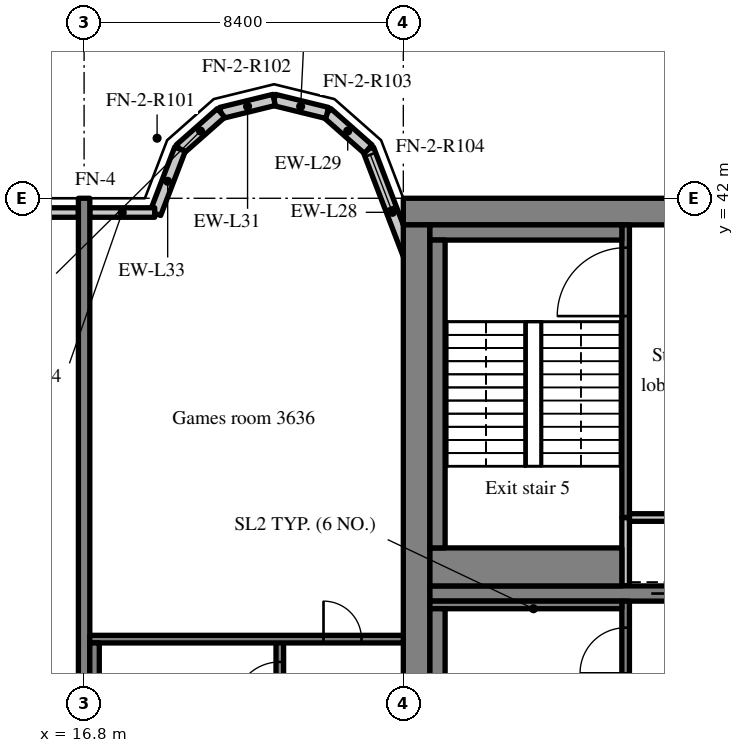
"""IFC4 building model, lengths in metres.
Left out: names, types, materials, properties, quantities, classifications, styles, units other than length and angle.
Written with IfcOpenShell. Run it as: python <this file> out.ifc"""

import sys

from ifc_helpers import new_model, si_unit, direction, frame, frame_2d, origin, place, context, subcontext, project, spatial, rectangle, extrude, source, transform, mapped, element, fill, save


model = new_model("IFC4")
c1 = context("Model", 3, precision=1e-05, world=origin(), true_north=direction((0.0, 1.0)))
c2 = subcontext(c1, "Body", "Model", "MODEL_VIEW")
j1 = project(units=[si_unit("LENGTHUNIT", "METRE"), si_unit("PLANEANGLEUNIT", "RADIAN")], contexts=[c1])
p1 = place(None, origin())
s1 = spatial("IfcSite", under=j1, at=p1, CompositionType="ELEMENT")
p2 = place(p1, origin())
s2 = spatial("IfcBuilding", under=s1, at=p2, CompositionType="ELEMENT")
p3 = place(p2, frame((0.0, 0.0, 151.6)))
s3 = spatial("IfcBuildingStorey", under=s2, at=p3, CompositionType="ELEMENT", Elevation=151.6)
m1 = source(origin(), c2, "Body", "SweptSolid", [
    extrude(rectangle(XDim=50.4, YDim=0.7, at=frame_2d((25.2, 0.0))), origin(), (0.0, 0.0, 1.0), 3.52),
])
p4 = place(p3, frame((25.2, 41.65, 0.0), z_axis=(0.0, 0.0, 1.0), x_axis=(1.0, 0.0, 0.0)))
e1 = element("IfcWall", 1, at=p4, inside=s3, PredefinedType="SHEAR", context=c2, shape_type="MappedRepresentation", body=[
    mapped(m1, transform((0.0, 0.0, 0.0), scale=1.0)),
])
m2 = source(origin(), c2, "Body", "SweptSolid", [
    extrude(rectangle(XDim=18.6, YDim=0.7, at=frame_2d((9.3, 0.0))), origin(), (0.0, 0.0, 1.0), 3.52),
])
p5 = place(p3, frame((25.55, 22.7, 0.0), z_axis=(0.0, 0.0, 1.0), x_axis=(0.0, 1.0, 0.0)))
e2 = element("IfcWall", 2, at=p5, inside=s3, PredefinedType="SHEAR", context=c2, shape_type="MappedRepresentation", body=[
    mapped(m2, transform((0.0, 0.0, 0.0), scale=1.0)),
])
m3 = source(origin(), c2, "Body", "SweptSolid", [
    extrude(rectangle(XDim=7.5, YDim=0.4, at=frame_2d((3.75, 0.0))), origin(), (0.0, 0.0, 1.0), 3.52),
])
p6 = place(p3, frame((25.9, 31.6, 0.0), z_axis=(0.0, 0.0, 1.0), x_axis=(1.0, 0.0, 0.0)))
e3 = element("IfcWall", 3, at=p6, inside=s3, PredefinedType="SHEAR", context=c2, shape_type="MappedRepresentation", body=[
    mapped(m3, transform((0.0, 0.0, 0.0), scale=1.0)),
])
m4 = source(origin(), c2, "Body", "SweptSolid", [
    extrude(rectangle(XDim=1.1, YDim=2.1, at=frame_2d((0.55, 1.05))), frame((0.0, 0.21, 0.0), z_axis=(0.0, -1.0, 0.0), x_axis=(1.0, 0.0, 0.0)), (0.0, 0.0, 1.0), 0.42),
])
p7 = place(p6, frame((5.825, 0.0, 0.0)))
e4 = element("IfcOpeningElement", 4, at=p7, cuts=e3, PredefinedType="OPENING", context=c2, shape_type="MappedRepresentation", body=[
    mapped(m4, transform((0.0, 0.0, 0.0), scale=1.0)),
])
m5 = source(origin(), c2, "Body", "SweptSolid", [
    extrude(rectangle(XDim=20.0, YDim=0.3, at=frame_2d((10.0, 0.0))), origin(), (0.0, 0.0, 1.0), 3.52),
])
p8 = place(p3, frame((16.8, 22.0, 0.0), z_axis=(0.0, 0.0, 1.0), x_axis=(0.0, 1.0, 0.0)))
e5 = element("IfcWall", 5, at=p8, inside=s3, PredefinedType="SHEAR", context=c2, shape_type="MappedRepresentation", body=[
    mapped(m5, transform((0.0, 0.0, 0.0), scale=1.0)),
])
m6 = source(origin(), c2, "Body", "SweptSolid", [
    extrude(rectangle(XDim=3.559, YDim=0.3, at=frame_2d((1.78, 0.0))), origin(), (0.0, 0.0, 1.0), 3.52),
])
p9 = place(p3, frame((25.55, 39.969, 0.0), z_axis=(0.0, 0.0, 1.0), x_axis=(-0.35779745313, 0.933799219604, 0.0)))
e6 = element("IfcWall", 6, at=p9, inside=s3, PredefinedType="SOLIDWALL", context=c2, shape_type="MappedRepresentation", body=[
    mapped(m6, transform((0.0, 0.0, 0.0), scale=1.0)),
])
m7 = source(origin(), c2, "Body", "SweptSolid", [
    extrude(rectangle(XDim=1.5, YDim=2.0, at=frame_2d((0.75, 1.0))), frame((0.0, 0.16, 0.0), z_axis=(0.0, -1.0, 0.0), x_axis=(1.0, 0.0, 0.0)), (0.0, 0.0, 1.0), 0.32),
])
p10 = place(p9, frame((1.903, 0.0, 0.9)))
e7 = element("IfcOpeningElement", 7, at=p10, cuts=e6, PredefinedType="OPENING", context=c2, shape_type="MappedRepresentation", body=[
    mapped(m7, transform((0.0, 0.0, 0.0), scale=1.0)),
])
m8 = source(origin(), c2, "Body", "SweptSolid", [
    extrude(rectangle(XDim=1.44, YDim=0.3, at=frame_2d((0.72, 0.0))), origin(), (0.0, 0.0, 1.0), 3.52),
])
p11 = place(p3, frame((24.277, 43.292, 0.0), z_axis=(0.0, 0.0, 1.0), x_axis=(-0.749649827867, 0.661834673902, 0.0)))
e8 = element("IfcWall", 8, at=p11, inside=s3, PredefinedType="SOLIDWALL", context=c2, shape_type="MappedRepresentation", body=[
    mapped(m8, transform((0.0, 0.0, 0.0), scale=1.0)),
])
m9 = source(origin(), c2, "Body", "SweptSolid", [
    extrude(rectangle(XDim=1.438, YDim=0.3, at=frame_2d((0.719, 0.0))), origin(), (0.0, 0.0, 1.0), 3.52),
])
p12 = place(p3, frame((23.197, 44.245, 0.0), z_axis=(0.0, 0.0, 1.0), x_axis=(-0.971152283879, 0.238460146601, 0.0)))
e9 = element("IfcWall", 9, at=p12, inside=s3, PredefinedType="SOLIDWALL", context=c2, shape_type="MappedRepresentation", body=[
    mapped(m9, transform((0.0, 0.0, 0.0), scale=1.0)),
])
m10 = source(origin(), c2, "Body", "SweptSolid", [
    extrude(rectangle(XDim=1.439, YDim=0.3, at=frame_2d((0.719, 0.0))), origin(), (0.0, 0.0, 1.0), 3.52),
])
p13 = place(p3, frame((21.8, 44.588, 0.0), z_axis=(0.0, 0.0, 1.0), x_axis=(-0.971161932466, -0.238420848351, 0.0)))
e10 = element("IfcWall", 10, at=p13, inside=s3, PredefinedType="SOLIDWALL", context=c2, shape_type="MappedRepresentation", body=[
    mapped(m10, transform((0.0, 0.0, 0.0), scale=1.0)),
])
m11 = source(origin(), c2, "Body", "SweptSolid", [
    extrude(rectangle(XDim=1.44, YDim=0.3, at=frame_2d((0.72, 0.0))), origin(), (0.0, 0.0, 1.0), 3.52),
])
p14 = place(p3, frame((20.403, 44.245, 0.0), z_axis=(0.0, 0.0, 1.0), x_axis=(-0.74957555648, -0.661918790432, 0.0)))
e11 = element("IfcWall", 11, at=p14, inside=s3, PredefinedType="SOLIDWALL", context=c2, shape_type="MappedRepresentation", body=[
    mapped(m11, transform((0.0, 0.0, 0.0), scale=1.0)),
])
m12 = source(origin(), c2, "Body", "SweptSolid", [
    extrude(rectangle(XDim=1.812, YDim=0.3, at=frame_2d((0.906, 0.0))), origin(), (0.0, 0.0, 1.0), 3.52),
])
p15 = place(p3, frame((19.323, 43.292, 0.0), z_axis=(0.0, 0.0, 1.0), x_axis=(-0.357877270961, -0.93376863244, 0.0)))
e12 = element("IfcWall", 12, at=p15, inside=s3, PredefinedType="SOLIDWALL", context=c2, shape_type="MappedRepresentation", body=[
    mapped(m12, transform((0.0, 0.0, 0.0), scale=1.0)),
])
m13 = source(origin(), c2, "Body", "SweptSolid", [
    extrude(rectangle(XDim=4.094, YDim=0.25, at=frame_2d((2.047, 0.0))), origin(), (0.0, 0.0, 1.0), 2.87),
])
p16 = place(p3, frame((16.65, 41.625, 0.0), z_axis=(0.0, 0.0, 1.0), x_axis=(-1.0, 0.0, 0.0)))
e13 = element("IfcWall", 13, at=p16, inside=s3, PredefinedType="SOLIDWALL", context=c2, shape_type="MappedRepresentation", body=[
    mapped(m13, transform((0.0, 0.0, 0.0), scale=1.0)),
])
m14 = source(origin(), c2, "Body", "SweptSolid", [
    extrude(rectangle(XDim=1.5, YDim=1.5, at=frame_2d((0.75, 0.75))), frame((0.0, 0.135, 0.0), z_axis=(0.0, -1.0, 0.0), x_axis=(1.0, 0.0, 0.0)), (0.0, 0.0, 1.0), 0.27),
])
p17 = place(p16, frame((1.297, 0.0, 0.9)))
e14 = element("IfcOpeningElement", 14, at=p17, cuts=e13, PredefinedType="OPENING", context=c2, shape_type="MappedRepresentation", body=[
    mapped(m14, transform((0.0, 0.0, 0.0), scale=1.0)),
])
m15 = source(origin(), c2, "Body", "SweptSolid", [
    extrude(rectangle(XDim=1.708, YDim=0.25, at=frame_2d((0.854, 0.0))), origin(), (0.0, 0.0, 1.0), 2.87),
])
p18 = place(p3, frame((18.658, 41.625, 0.0), z_axis=(0.0, 0.0, 1.0), x_axis=(-1.0, 0.0, 0.0)))
e15 = element("IfcWall", 15, at=p18, inside=s3, PredefinedType="SOLIDWALL", context=c2, shape_type="MappedRepresentation", body=[
    mapped(m15, transform((0.0, 0.0, 0.0), scale=1.0)),
])
m16 = source(origin(), c2, "Body", "SweptSolid", [
    extrude(rectangle(XDim=8.7, YDim=0.2, at=frame_2d((4.35, 0.0))), origin(), (0.0, 0.0, 1.0), 3.52),
])
p19 = place(p3, frame((31.05, 22.7, 0.0), z_axis=(0.0, 0.0, 1.0), x_axis=(0.0, 1.0, 0.0)))
e16 = element("IfcWall", 16, at=p19, inside=s3, PredefinedType="SOLIDWALL", context=c2, shape_type="MappedRepresentation", body=[
    mapped(m16, transform((0.0, 0.0, 0.0), scale=1.0)),
])
m17 = source(origin(), c2, "Body", "SweptSolid", [
    extrude(rectangle(XDim=1.2, YDim=2.1, at=frame_2d((0.6, 1.05))), frame((0.0, 0.11, 0.0), z_axis=(0.0, -1.0, 0.0), x_axis=(1.0, 0.0, 0.0)), (0.0, 0.0, 1.0), 0.22),
])
p20 = place(p19, frame((6.8, 0.0, 0.0)))
e17 = element("IfcOpeningElement", 17, at=p20, cuts=e16, PredefinedType="OPENING", context=c2, shape_type="MappedRepresentation", body=[
    mapped(m17, transform((0.0, 0.0, 0.0), scale=1.0)),
])
m18 = source(origin(), c2, "Body", "SweptSolid", [
    extrude(rectangle(XDim=1.8, YDim=0.2, at=frame_2d((0.9, 0.0))), origin(), (0.0, 0.0, 1.0), 3.52),
])
p21 = place(p3, frame((31.05, 31.8, 0.0), z_axis=(0.0, 0.0, 1.0), x_axis=(0.0, 1.0, 0.0)))
e18 = element("IfcWall", 18, at=p21, inside=s3, PredefinedType="SOLIDWALL", context=c2, shape_type="MappedRepresentation", body=[
    mapped(m18, transform((0.0, 0.0, 0.0), scale=1.0)),
])
m19 = source(origin(), c2, "Body", "SweptSolid", [
    extrude(rectangle(XDim=2.25, YDim=0.2, at=frame_2d((1.125, 0.0))), origin(), (0.0, 0.0, 1.0), 3.52),
])
p22 = place(p3, frame((31.15, 33.6, 0.0), z_axis=(0.0, 0.0, 1.0), x_axis=(1.0, 0.0, 0.0)))
e19 = element("IfcWall", 19, at=p22, inside=s3, PredefinedType="SOLIDWALL", context=c2, shape_type="MappedRepresentation", body=[
    mapped(m19, transform((0.0, 0.0, 0.0), scale=1.0)),
])
m20 = source(origin(), c2, "Body", "SweptSolid", [
    extrude(rectangle(XDim=7.7, YDim=0.2, at=frame_2d((3.85, 0.0))), origin(), (0.0, 0.0, 1.0), 3.52),
])
p23 = place(p3, frame((31.05, 33.6, 0.0), z_axis=(0.0, 0.0, 1.0), x_axis=(0.0, 1.0, 0.0)))
e20 = element("IfcWall", 20, at=p23, inside=s3, PredefinedType="SOLIDWALL", context=c2, shape_type="MappedRepresentation", body=[
    mapped(m20, transform((0.0, 0.0, 0.0), scale=1.0)),
])
m21 = source(origin(), c2, "Body", "SweptSolid", [
    extrude(rectangle(XDim=1.8, YDim=2.1, at=frame_2d((0.9, 1.05))), frame((0.0, 0.11, 0.0), z_axis=(0.0, -1.0, 0.0), x_axis=(1.0, 0.0, 0.0)), (0.0, 0.0, 1.0), 0.22),
])
p24 = place(p23, frame((5.3, 0.0, 0.0)))
e21 = element("IfcOpeningElement", 21, at=p24, cuts=e20, PredefinedType="OPENING", context=c2, shape_type="MappedRepresentation", body=[
    mapped(m21, transform((0.0, 0.0, 0.0), scale=1.0)),
])
m22 = source(origin(), c2, "Body", "SweptSolid", [
    extrude(rectangle(XDim=8.3, YDim=0.2, at=frame_2d((4.15, 0.0))), origin(), (0.0, 0.0, 1.0), 3.52),
])
p25 = place(p3, frame((21.95, 22.1, 0.0), z_axis=(0.0, 0.0, 1.0), x_axis=(0.0, 1.0, 0.0)))
e22 = element("IfcWall", 22, at=p25, inside=s3, PredefinedType="SOLIDWALL", context=c2, shape_type="MappedRepresentation", body=[
    mapped(m22, transform((0.0, 0.0, 0.0), scale=1.0)),
])
p26 = place(p25, frame((6.5, 0.0, 0.0)))
e23 = element("IfcOpeningElement", 23, at=p26, cuts=e22, PredefinedType="OPENING", context=c2, shape_type="MappedRepresentation", body=[
    mapped(m17, transform((0.0, 0.0, 0.0), scale=1.0)),
])
m23 = source(origin(), c2, "Body", "SweptSolid", [
    extrude(rectangle(XDim=8.25, YDim=0.2, at=frame_2d((4.125, 0.0))), origin(), (0.0, 0.0, 1.0), 3.52),
])
p27 = place(p3, frame((16.95, 30.4, 0.0), z_axis=(0.0, 0.0, 1.0), x_axis=(1.0, 0.0, 0.0)))
e24 = element("IfcWall", 24, at=p27, inside=s3, PredefinedType="SOLIDWALL", context=c2, shape_type="MappedRepresentation", body=[
    mapped(m23, transform((0.0, 0.0, 0.0), scale=1.0)),
])
m24 = source(origin(), c2, "Body", "SweptSolid", [
    extrude(rectangle(XDim=1.0, YDim=2.1, at=frame_2d((0.5, 1.05))), frame((0.0, 0.11, 0.0), z_axis=(0.0, -1.0, 0.0), x_axis=(1.0, 0.0, 0.0)), (0.0, 0.0, 1.0), 0.22),
])
p28 = place(p27, frame((6.15, 0.0, 0.0)))
e25 = element("IfcOpeningElement", 25, at=p28, cuts=e24, PredefinedType="OPENING", context=c2, shape_type="MappedRepresentation", body=[
    mapped(m24, transform((0.0, 0.0, 0.0), scale=1.0)),
])
m25 = source(origin(), c2, "Body", "SweptSolid", [
    extrude(rectangle(XDim=5.05, YDim=0.2, at=frame_2d((2.525, 0.0))), origin(), (0.0, 0.0, 1.0), 3.52),
])
p29 = place(p3, frame((25.9, 31.3, 0.0), z_axis=(0.0, 0.0, 1.0), x_axis=(1.0, 0.0, 0.0)))
e26 = element("IfcWall", 26, at=p29, inside=s3, PredefinedType="SOLIDWALL", context=c2, shape_type="MappedRepresentation", body=[
    mapped(m25, transform((0.0, 0.0, 0.0), scale=1.0)),
])
m26 = source(origin(), c2, "Body", "SweptSolid", [
    extrude(rectangle(XDim=8.1, YDim=0.4, at=frame_2d((4.05, 0.0))), origin(), (0.0, 0.0, 1.0), 3.52),
])
p30 = place(p3, frame((26.1, 23.1, 0.0), z_axis=(0.0, 0.0, 1.0), x_axis=(0.0, 1.0, 0.0)))
e27 = element("IfcWall", 27, at=p30, inside=s3, PredefinedType="SOLIDWALL", context=c2, shape_type="MappedRepresentation", body=[
    mapped(m26, transform((0.0, 0.0, 0.0), scale=1.0)),
])
m27 = source(origin(), c2, "Body", "SweptSolid", [
    extrude(rectangle(XDim=8.1, YDim=0.25, at=frame_2d((4.05, 0.0))), origin(), (0.0, 0.0, 1.0), 3.52),
])
p31 = place(p3, frame((17.075, 22.2, 0.0), z_axis=(0.0, 0.0, 1.0), x_axis=(0.0, 1.0, 0.0)))
e28 = element("IfcWall", 28, at=p31, inside=s3, PredefinedType="SOLIDWALL", context=c2, shape_type="MappedRepresentation", body=[
    mapped(m27, transform((0.0, 0.0, 0.0), scale=1.0)),
])
m28 = source(origin(), c2, "Body", "SweptSolid", [
    extrude(rectangle(XDim=5.05, YDim=0.4, at=frame_2d((2.525, 0.0))), origin(), (0.0, 0.0, 1.0), 3.52),
])
p32 = place(p3, frame((25.9, 41.1, 0.0), z_axis=(0.0, 0.0, 1.0), x_axis=(1.0, 0.0, 0.0)))
e29 = element("IfcWall", 29, at=p32, inside=s3, PredefinedType="SOLIDWALL", context=c2, shape_type="MappedRepresentation", body=[
    mapped(m28, transform((0.0, 0.0, 0.0), scale=1.0)),
])
m29 = source(origin(), c2, "Body", "SweptSolid", [
    extrude(rectangle(XDim=5.05, YDim=1.0, at=frame_2d((2.525, 0.0))), origin(), (0.0, 0.0, 1.0), 3.52),
])
p33 = place(p3, frame((25.9, 32.3, 0.0), z_axis=(0.0, 0.0, 1.0), x_axis=(1.0, 0.0, 0.0)))
e30 = element("IfcWall", 30, at=p33, inside=s3, PredefinedType="SOLIDWALL", context=c2, shape_type="MappedRepresentation", body=[
    mapped(m29, transform((0.0, 0.0, 0.0), scale=1.0)),
])
p34 = place(p3, frame((26.1, 32.8, 0.0), z_axis=(0.0, 0.0, 1.0), x_axis=(0.0, 1.0, 0.0)))
e31 = element("IfcWall", 31, at=p34, inside=s3, PredefinedType="SOLIDWALL", context=c2, shape_type="MappedRepresentation", body=[
    mapped(m26, transform((0.0, 0.0, 0.0), scale=1.0)),
])
m30 = source(origin(), c2, "Body", "SweptSolid", [
    extrude(rectangle(XDim=1.5, YDim=2.0, at=frame_2d((0.75, 1.0))), frame((0.0, 0.03, 0.0), z_axis=(0.0, -1.0, 0.0), x_axis=(1.0, 0.0, 0.0)), (0.0, 0.0, 1.0), 0.06),
])
p35 = place(p10, origin())
e32 = element("IfcWindow", 32, at=p35, inside=s3, PartitioningType="SINGLE_PANEL", PredefinedType="WINDOW", context=c2, shape_type="MappedRepresentation", body=[
    mapped(m30, transform((0.0, 0.0, 0.0), scale=1.0)),
])
fill(e7, e32)
m31 = source(origin(), c2, "Body", "SweptSolid", [
    extrude(rectangle(XDim=1.2, YDim=2.1, at=frame_2d((0.6, 1.05))), frame((0.0, 0.025, 0.0), z_axis=(0.0, -1.0, 0.0), x_axis=(1.0, 0.0, 0.0)), (0.0, 0.0, 1.0), 0.05),
])
p36 = place(p20, origin())
e33 = element("IfcDoor", 33, at=p36, inside=s3, OperationType="SINGLE_SWING_LEFT", PredefinedType="DOOR", context=c2, shape_type="MappedRepresentation", body=[
    mapped(m31, transform((0.0, 0.0, 0.0), scale=1.0)),
])
fill(e17, e33)
m32 = source(origin(), c2, "Body", "SweptSolid", [
    extrude(rectangle(XDim=1.1, YDim=2.1, at=frame_2d((0.55, 1.05))), frame((0.0, 0.025, 0.0), z_axis=(0.0, -1.0, 0.0), x_axis=(1.0, 0.0, 0.0)), (0.0, 0.0, 1.0), 0.05),
])
p37 = place(p7, origin())
e34 = element("IfcDoor", 34, at=p37, inside=s3, OperationType="SLIDING_TO_RIGHT", PredefinedType="DOOR", context=c2, shape_type="MappedRepresentation", body=[
    mapped(m32, transform((0.0, 0.0, 0.0), scale=1.0)),
])
fill(e4, e34)
m33 = source(origin(), c2, "Body", "SweptSolid", [
    extrude(rectangle(XDim=1.8, YDim=2.1, at=frame_2d((0.9, 1.05))), frame((0.0, 0.025, 0.0), z_axis=(0.0, -1.0, 0.0), x_axis=(1.0, 0.0, 0.0)), (0.0, 0.0, 1.0), 0.05),
])
p38 = place(p24, origin())
e35 = element("IfcDoor", 35, at=p38, inside=s3, OperationType="SINGLE_SWING_LEFT", PredefinedType="DOOR", context=c2, shape_type="MappedRepresentation", body=[
    mapped(m33, transform((0.0, 0.0, 0.0), scale=1.0)),
])
fill(e21, e35)
p39 = place(p26, origin())
e36 = element("IfcDoor", 36, at=p39, inside=s3, OperationType="SINGLE_SWING_LEFT", PredefinedType="DOOR", context=c2, shape_type="MappedRepresentation", body=[
    mapped(m31, transform((0.0, 0.0, 0.0), scale=1.0)),
])
fill(e23, e36)
m34 = source(origin(), c2, "Body", "SweptSolid", [
    extrude(rectangle(XDim=1.0, YDim=2.1, at=frame_2d((0.5, 1.05))), frame((0.0, 0.025, 0.0), z_axis=(0.0, -1.0, 0.0), x_axis=(1.0, 0.0, 0.0)), (0.0, 0.0, 1.0), 0.05),
])
p40 = place(p28, origin())
e37 = element("IfcDoor", 37, at=p40, inside=s3, OperationType="SINGLE_SWING_LEFT", PredefinedType="DOOR", context=c2, shape_type="MappedRepresentation", body=[
    mapped(m34, transform((0.0, 0.0, 0.0), scale=1.0)),
])
fill(e25, e37)
save(model, sys.argv[1])
